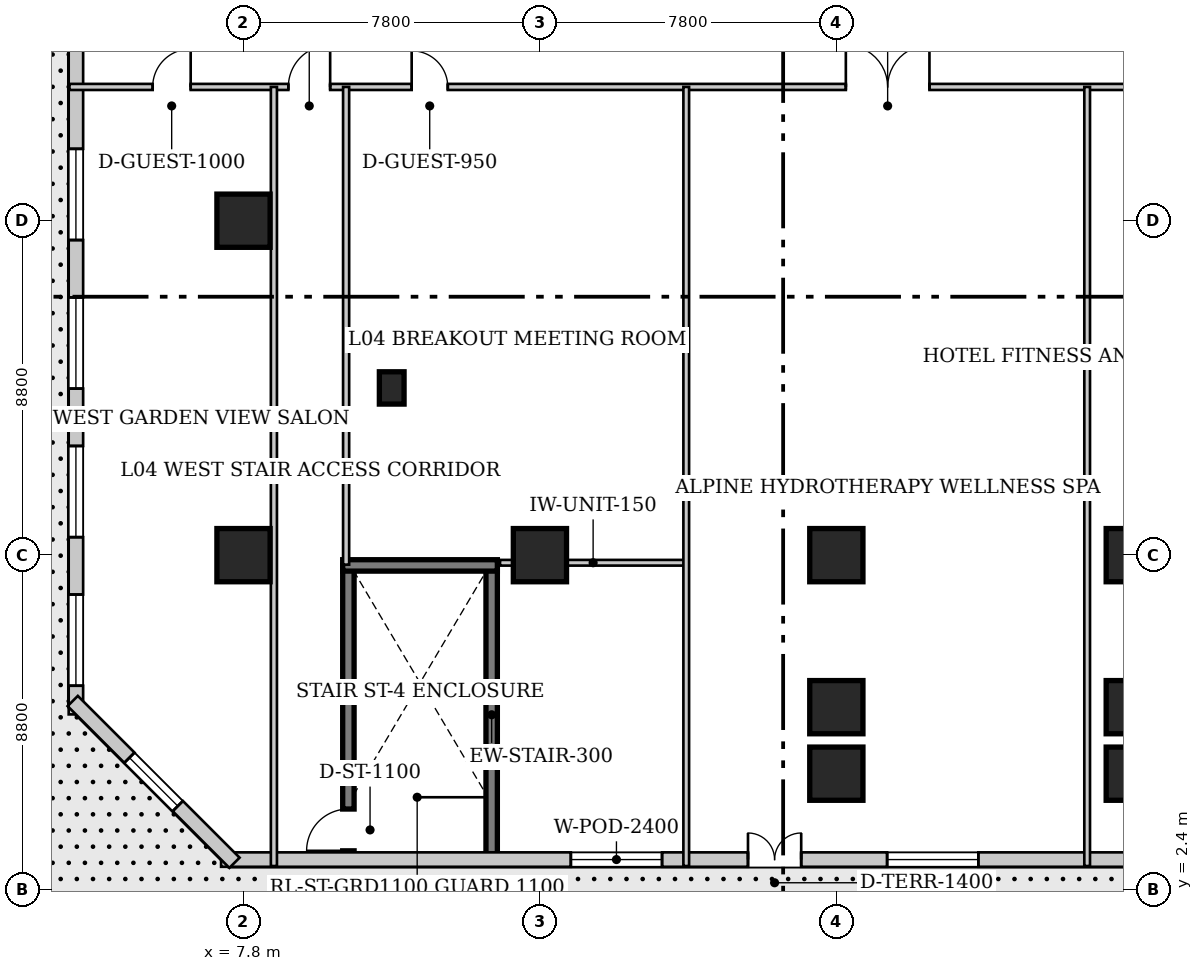
"""IFC4 building model, lengths in metres.
Left out: names, types, materials, properties, quantities, classifications, styles, units other than length and angle.
Written with IfcOpenShell. Run it as: python <this file> out.ifc"""

import sys

from ifc_helpers import new_model, si_unit, direction, frame, frame_2d, origin, origin_2d, place, context, subcontext, project, spatial, rectangle, extrude, element, fill, save


model = new_model("IFC4")
c1 = context("Model", 3, precision=1e-05, world=origin(), true_north=direction((0.0, 1.0)))
c2 = subcontext(c1, "Body", "Model", "MODEL_VIEW")
j1 = project(units=[si_unit("LENGTHUNIT", "METRE"), si_unit("PLANEANGLEUNIT", "RADIAN")], contexts=[c1])
p1 = place(None, origin())
s1 = spatial("IfcSite", under=j1, at=p1, CompositionType="ELEMENT")
p2 = place(p1, origin())
s2 = spatial("IfcBuilding", under=s1, at=p2, CompositionType="ELEMENT")
p3 = place(p2, frame((0.0, 0.0, 20.8)))
s3 = spatial("IfcBuildingStorey", under=s2, at=p3, CompositionType="ELEMENT", Elevation=20.8)
p4 = place(p3, frame((10.56, 3.07, 0.0), z_axis=(0.0, 0.0, 1.0), x_axis=(0.0, 1.0, 0.0)))
e1 = element("IfcWall", 1, at=p4, inside=s3, PredefinedType="SHEAR", context=c2, shape_type="SweptSolid", body=[
    extrude(rectangle(XDim=7.86, YDim=0.3, at=frame_2d((3.93, 0.0))), origin(), (0.0, 0.0, 1.0), 5.2),
])
p5 = place(p4, frame((0.35, 0.0, 0.0)))
e2 = element("IfcOpeningElement", 2, at=p5, cuts=e1, PredefinedType="OPENING", context=c2, shape_type="SweptSolid", body=[
    extrude(rectangle(XDim=1.1, YDim=2.15, at=frame_2d((0.55, 1.075))), frame((0.0, 0.16, 0.0), z_axis=(0.0, -1.0, 0.0), x_axis=(1.0, 0.0, 0.0)), (0.0, 0.0, 1.0), 0.32),
])
p6 = place(p3, frame((14.33, 3.07, 0.0), z_axis=(0.0, 0.0, 1.0), x_axis=(0.0, 1.0, 0.0)))
e3 = element("IfcWall", 3, at=p6, inside=s3, PredefinedType="SHEAR", context=c2, shape_type="SweptSolid", body=[
    extrude(rectangle(XDim=7.86, YDim=0.3, at=frame_2d((3.93, 0.0))), origin(), (0.0, 0.0, 1.0), 5.2),
])
p7 = place(p3, frame((10.41, 10.93, 0.0), z_axis=(0.0, 0.0, 1.0), x_axis=(1.0, 0.0, 0.0)))
e4 = element("IfcWall", 4, at=p7, inside=s3, PredefinedType="SHEAR", context=c2, shape_type="SweptSolid", body=[
    extrude(rectangle(XDim=4.07, YDim=0.3, at=frame_2d((2.035, 0.0))), origin(), (0.0, 0.0, 1.0), 5.2),
])
for number, where, z_axis, x_axis in (
    (5, (7.8, 11.2, 0.0), (0.0, 0.0, 1.0), (1.0, 0.0, 0.0)),
    (6, (7.8, 20.0, 0.0), (0.0, 0.0, 1.0), (1.0, 0.0, 0.0)),
    (7, (15.6, 11.2, 0.0), (0.0, 0.0, 1.0), (1.0, 0.0, 0.0)),
    (8, (23.4, 11.2, 0.0), (0.0, 0.0, 1.0), (1.0, 0.0, 0.0)),
    (9, (31.2, 11.2, 0.0), (0.0, 0.0, 1.0), (1.0, 0.0, 0.0)),
    (10, (23.4, 7.2, 0.0), (0.0, 0.0, 1.0), (1.0, 0.0, 0.0)),
    (11, (31.2, 7.2, 0.0), (0.0, 0.0, 1.0), (1.0, 0.0, 0.0)),
    (12, (23.4, 5.45, 0.0), (0.0, 0.0, 1.0), (1.0, 0.0, 0.0)),
    (13, (31.2, 5.45, 0.0), (0.0, 0.0, 1.0), (1.0, 0.0, 0.0)),
):
    element("IfcColumn", number, at=place(p3, frame(where, z_axis=z_axis, x_axis=x_axis)), inside=s3, PredefinedType="COLUMN", context=c2, shape_type="SweptSolid", body=[
        extrude(rectangle(XDim=1.4, YDim=1.4, at=origin_2d()), origin(), (0.0, 0.0, 1.0), 5.2),
    ])
p8 = place(p3, frame((11.7, 15.6, 0.0), z_axis=(0.0, 0.0, 1.0), x_axis=(1.0, 0.0, 0.0)))
e14 = element("IfcColumn", 14, at=p8, inside=s3, PredefinedType="PILASTER", context=c2, shape_type="SweptSolid", body=[
    extrude(rectangle(XDim=0.65, YDim=0.85, at=origin_2d()), origin(), (0.0, 0.0, 1.0), 5.2),
])
p9 = place(p3, frame((7.21, 3.19, 0.0), z_axis=(0.0, 0.0, 1.0), x_axis=(1.0, 0.0, 0.0)))
e15 = element("IfcWall", 15, at=p9, inside=s3, PredefinedType="SOLIDWALL", context=c2, shape_type="SweptSolid", body=[
    extrude(rectangle(XDim=29.13, YDim=0.38, at=frame_2d((14.565, 0.0))), origin(), (0.0, 0.0, 1.0), 4.94),
])
p10 = place(p9, frame((13.865, 0.0, 0.0)))
e16 = element("IfcOpeningElement", 16, at=p10, cuts=e15, PredefinedType="OPENING", context=c2, shape_type="SweptSolid", body=[
    extrude(rectangle(XDim=1.4, YDim=2.15, at=frame_2d((0.7, 1.075))), frame((0.0, 0.2, 0.0), z_axis=(0.0, -1.0, 0.0), x_axis=(1.0, 0.0, 0.0)), (0.0, 0.0, 1.0), 0.4),
])
p11 = place(p9, frame((9.204, 0.0, 0.75)))
e17 = element("IfcOpeningElement", 17, at=p11, cuts=e15, PredefinedType="OPENING", context=c2, shape_type="SweptSolid", body=[
    extrude(rectangle(XDim=2.4, YDim=2.2, at=frame_2d((1.2, 1.1))), frame((0.0, 0.2, 0.0), z_axis=(0.0, -1.0, 0.0), x_axis=(1.0, 0.0, 0.0)), (0.0, 0.0, 1.0), 0.4),
])
p12 = place(p9, frame((17.526, 0.0, 0.75)))
e18 = element("IfcOpeningElement", 18, at=p12, cuts=e15, PredefinedType="OPENING", context=c2, shape_type="SweptSolid", body=[
    extrude(rectangle(XDim=2.4, YDim=2.2, at=frame_2d((1.2, 1.1))), frame((0.0, 0.2, 0.0), z_axis=(0.0, -1.0, 0.0), x_axis=(1.0, 0.0, 0.0)), (0.0, 0.0, 1.0), 0.4),
])
p13 = place(p9, frame((25.849, 0.0, 0.75)))
e19 = element("IfcOpeningElement", 19, at=p13, cuts=e15, PredefinedType="OPENING", context=c2, shape_type="SweptSolid", body=[
    extrude(rectangle(XDim=2.4, YDim=2.2, at=frame_2d((1.2, 1.1))), frame((0.0, 0.2, 0.0), z_axis=(0.0, -1.0, 0.0), x_axis=(1.0, 0.0, 0.0)), (0.0, 0.0, 1.0), 0.4),
])
p14 = place(p3, frame((3.39, 42.19, 0.0), z_axis=(0.0, 0.0, 1.0), x_axis=(0.0, -1.0, 0.0)))
e20 = element("IfcWall", 20, at=p14, inside=s3, PredefinedType="SOLIDWALL", context=c2, shape_type="SweptSolid", body=[
    extrude(rectangle(XDim=35.18, YDim=0.38, at=frame_2d((17.59, 0.0))), origin(), (0.0, 0.0, 1.0), 4.94),
])
p15 = place(p14, frame((0.754, 0.0, 0.75)))
e21 = element("IfcOpeningElement", 21, at=p15, cuts=e20, PredefinedType="OPENING", context=c2, shape_type="SweptSolid", body=[
    extrude(rectangle(XDim=2.4, YDim=2.2, at=frame_2d((1.2, 1.1))), frame((0.0, 0.2, 0.0), z_axis=(0.0, -1.0, 0.0), x_axis=(1.0, 0.0, 0.0)), (0.0, 0.0, 1.0), 0.4),
])
p16 = place(p14, frame((4.663, 0.0, 0.75)))
e22 = element("IfcOpeningElement", 22, at=p16, cuts=e20, PredefinedType="OPENING", context=c2, shape_type="SweptSolid", body=[
    extrude(rectangle(XDim=2.4, YDim=2.2, at=frame_2d((1.2, 1.1))), frame((0.0, 0.2, 0.0), z_axis=(0.0, -1.0, 0.0), x_axis=(1.0, 0.0, 0.0)), (0.0, 0.0, 1.0), 0.4),
])
p17 = place(p14, frame((8.572, 0.0, 0.75)))
e23 = element("IfcOpeningElement", 23, at=p17, cuts=e20, PredefinedType="OPENING", context=c2, shape_type="SweptSolid", body=[
    extrude(rectangle(XDim=2.4, YDim=2.2, at=frame_2d((1.2, 1.1))), frame((0.0, 0.2, 0.0), z_axis=(0.0, -1.0, 0.0), x_axis=(1.0, 0.0, 0.0)), (0.0, 0.0, 1.0), 0.4),
])
p18 = place(p14, frame((12.481, 0.0, 0.75)))
e24 = element("IfcOpeningElement", 24, at=p18, cuts=e20, PredefinedType="OPENING", context=c2, shape_type="SweptSolid", body=[
    extrude(rectangle(XDim=2.4, YDim=2.2, at=frame_2d((1.2, 1.1))), frame((0.0, 0.2, 0.0), z_axis=(0.0, -1.0, 0.0), x_axis=(1.0, 0.0, 0.0)), (0.0, 0.0, 1.0), 0.4),
])
p19 = place(p14, frame((20.299, 0.0, 0.75)))
e25 = element("IfcOpeningElement", 25, at=p19, cuts=e20, PredefinedType="OPENING", context=c2, shape_type="SweptSolid", body=[
    extrude(rectangle(XDim=2.4, YDim=2.2, at=frame_2d((1.2, 1.1))), frame((0.0, 0.2, 0.0), z_axis=(0.0, -1.0, 0.0), x_axis=(1.0, 0.0, 0.0)), (0.0, 0.0, 1.0), 0.4),
])
p20 = place(p14, frame((24.208, 0.0, 0.75)))
e26 = element("IfcOpeningElement", 26, at=p20, cuts=e20, PredefinedType="OPENING", context=c2, shape_type="SweptSolid", body=[
    extrude(rectangle(XDim=2.4, YDim=2.2, at=frame_2d((1.2, 1.1))), frame((0.0, 0.2, 0.0), z_axis=(0.0, -1.0, 0.0), x_axis=(1.0, 0.0, 0.0)), (0.0, 0.0, 1.0), 0.4),
])
p21 = place(p14, frame((28.117, 0.0, 0.75)))
e27 = element("IfcOpeningElement", 27, at=p21, cuts=e20, PredefinedType="OPENING", context=c2, shape_type="SweptSolid", body=[
    extrude(rectangle(XDim=2.4, YDim=2.2, at=frame_2d((1.2, 1.1))), frame((0.0, 0.2, 0.0), z_axis=(0.0, -1.0, 0.0), x_axis=(1.0, 0.0, 0.0)), (0.0, 0.0, 1.0), 0.4),
])
p22 = place(p14, frame((32.026, 0.0, 0.75)))
e28 = element("IfcOpeningElement", 28, at=p22, cuts=e20, PredefinedType="OPENING", context=c2, shape_type="SweptSolid", body=[
    extrude(rectangle(XDim=2.4, YDim=2.2, at=frame_2d((1.2, 1.1))), frame((0.0, 0.2, 0.0), z_axis=(0.0, -1.0, 0.0), x_axis=(1.0, 0.0, 0.0)), (0.0, 0.0, 1.0), 0.4),
])
p23 = place(p3, frame((3.306, 7.363, 0.0), z_axis=(0.0, 0.0, 1.0), x_axis=(0.707106781187, -0.707106781187, 0.0)))
e29 = element("IfcWall", 29, at=p23, inside=s3, PredefinedType="SOLIDWALL", context=c2, shape_type="SweptSolid", body=[
    extrude(rectangle(XDim=6.019, YDim=0.38, at=frame_2d((3.01, 0.0))), origin(), (0.0, 0.0, 1.0), 4.94),
])
p24 = place(p23, frame((2.11, 0.0, 0.8)))
e30 = element("IfcOpeningElement", 30, at=p24, cuts=e29, PredefinedType="OPENING", context=c2, shape_type="SweptSolid", body=[
    extrude(rectangle(XDim=1.8, YDim=2.1, at=frame_2d((0.9, 1.05))), frame((0.0, 0.2, 0.0), z_axis=(0.0, -1.0, 0.0), x_axis=(1.0, 0.0, 0.0)), (0.0, 0.0, 1.0), 0.4),
])
p25 = place(p3, frame((3.22, 23.52, 0.0), z_axis=(0.0, 0.0, 1.0), x_axis=(1.0, 0.0, 0.0)))
e31 = element("IfcWall", 31, at=p25, inside=s3, PredefinedType="PARTITIONING", context=c2, shape_type="SweptSolid", body=[
    extrude(rectangle(XDim=71.56, YDim=0.16, at=frame_2d((35.78, 0.0))), origin(), (0.0, 0.0, 1.0), 4.94),
])
p26 = place(p25, frame((2.19, 0.0, 0.0)))
e32 = element("IfcOpeningElement", 32, at=p26, cuts=e31, PredefinedType="OPENING", context=c2, shape_type="SweptSolid", body=[
    extrude(rectangle(XDim=1.0, YDim=2.15, at=frame_2d((0.5, 1.075))), frame((0.0, 0.09, 0.0), z_axis=(0.0, -1.0, 0.0), x_axis=(1.0, 0.0, 0.0)), (0.0, 0.0, 1.0), 0.18),
])
p27 = place(p25, frame((5.76, 0.0, 0.0)))
e33 = element("IfcOpeningElement", 33, at=p27, cuts=e31, PredefinedType="OPENING", context=c2, shape_type="SweptSolid", body=[
    extrude(rectangle(XDim=1.1, YDim=2.15, at=frame_2d((0.55, 1.075))), frame((0.0, 0.09, 0.0), z_axis=(0.0, -1.0, 0.0), x_axis=(1.0, 0.0, 0.0)), (0.0, 0.0, 1.0), 0.18),
])
p28 = place(p25, frame((9.005, 0.0, 0.0)))
e34 = element("IfcOpeningElement", 34, at=p28, cuts=e31, PredefinedType="OPENING", context=c2, shape_type="SweptSolid", body=[
    extrude(rectangle(XDim=0.95, YDim=2.1, at=frame_2d((0.475, 1.05))), frame((0.0, 0.09, 0.0), z_axis=(0.0, -1.0, 0.0), x_axis=(1.0, 0.0, 0.0)), (0.0, 0.0, 1.0), 0.18),
])
p29 = place(p25, frame((20.43, 0.0, 0.0)))
e35 = element("IfcOpeningElement", 35, at=p29, cuts=e31, PredefinedType="OPENING", context=c2, shape_type="SweptSolid", body=[
    extrude(rectangle(XDim=2.2, YDim=2.4, at=frame_2d((1.1, 1.2))), frame((0.0, 0.09, 0.0), z_axis=(0.0, -1.0, 0.0), x_axis=(1.0, 0.0, 0.0)), (0.0, 0.0, 1.0), 0.18),
])
p30 = place(p25, frame((29.055, 0.0, 0.0)))
e36 = element("IfcOpeningElement", 36, at=p30, cuts=e31, PredefinedType="OPENING", context=c2, shape_type="SweptSolid", body=[
    extrude(rectangle(XDim=2.2, YDim=2.4, at=frame_2d((1.1, 1.2))), frame((0.0, 0.09, 0.0), z_axis=(0.0, -1.0, 0.0), x_axis=(1.0, 0.0, 0.0)), (0.0, 0.0, 1.0), 0.18),
])
p31 = place(p25, frame((47.505, 0.0, 0.0)))
e37 = element("IfcOpeningElement", 37, at=p31, cuts=e31, PredefinedType="OPENING", context=c2, shape_type="SweptSolid", body=[
    extrude(rectangle(XDim=2.2, YDim=2.4, at=frame_2d((1.1, 1.2))), frame((0.0, 0.09, 0.0), z_axis=(0.0, -1.0, 0.0), x_axis=(1.0, 0.0, 0.0)), (0.0, 0.0, 1.0), 0.18),
])
p32 = place(p25, frame((64.03, 0.0, 0.0)))
e38 = element("IfcOpeningElement", 38, at=p32, cuts=e31, PredefinedType="OPENING", context=c2, shape_type="SweptSolid", body=[
    extrude(rectangle(XDim=2.2, YDim=2.4, at=frame_2d((1.1, 1.2))), frame((0.0, 0.09, 0.0), z_axis=(0.0, -1.0, 0.0), x_axis=(1.0, 0.0, 0.0)), (0.0, 0.0, 1.0), 0.18),
])
p33 = place(p25, frame((35.34, 0.0, 0.0)))
e39 = element("IfcOpeningElement", 39, at=p33, cuts=e31, PredefinedType="OPENING", context=c2, shape_type="SweptSolid", body=[
    extrude(rectangle(XDim=0.88, YDim=2.05, at=frame_2d((0.44, 1.025))), frame((0.0, 0.09, 0.0), z_axis=(0.0, -1.0, 0.0), x_axis=(1.0, 0.0, 0.0)), (0.0, 0.0, 1.0), 0.18),
])
p34 = place(p3, frame((8.6, 3.02, 0.0), z_axis=(0.0, 0.0, 1.0), x_axis=(0.0, 1.0, 0.0)))
e40 = element("IfcWall", 40, at=p34, inside=s3, PredefinedType="PARTITIONING", context=c2, shape_type="SweptSolid", body=[
    extrude(rectangle(XDim=20.5, YDim=0.16, at=frame_2d((10.25, 0.0))), origin(), (0.0, 0.0, 1.0), 4.94),
])
p35 = place(p3, frame((10.5, 10.95, 0.0), z_axis=(0.0, 0.0, 1.0), x_axis=(0.0, 1.0, 0.0)))
e41 = element("IfcWall", 41, at=p35, inside=s3, PredefinedType="PARTITIONING", context=c2, shape_type="SweptSolid", body=[
    extrude(rectangle(XDim=12.57, YDim=0.16, at=frame_2d((6.285, 0.0))), origin(), (0.0, 0.0, 1.0), 4.94),
])
p36 = place(p3, frame((14.55, 11.0, 0.0), z_axis=(0.0, 0.0, 1.0), x_axis=(1.0, 0.0, 0.0)))
e42 = element("IfcWall", 42, at=p36, inside=s3, PredefinedType="PARTITIONING", context=c2, shape_type="SweptSolid", body=[
    extrude(rectangle(XDim=4.9, YDim=0.15, at=frame_2d((2.45, 0.0))), origin(), (0.0, 0.0, 1.0), 3.9),
])
for number, where, z_axis, x_axis in (
    (43, (19.45, 3.02, 0.0), (0.0, 0.0, 1.0), (0.0, 1.0, 0.0)),
    (44, (30.0, 3.02, 0.0), (0.0, 0.0, 1.0), (0.0, 1.0, 0.0)),
):
    element("IfcWall", number, at=place(p3, frame(where, z_axis=z_axis, x_axis=x_axis)), inside=s3, PredefinedType="PARTITIONING", context=c2, shape_type="SweptSolid", body=[
        extrude(rectangle(XDim=20.5, YDim=0.15, at=frame_2d((10.25, 0.0))), origin(), (0.0, 0.0, 1.0), 4.94),
    ])
p37 = place(p10, origin())
e45 = element("IfcDoor", 45, at=p37, inside=s3, OperationType="DOUBLE_DOOR_SINGLE_SWING", PredefinedType="DOOR", context=c2, shape_type="SweptSolid", body=[
    extrude(rectangle(XDim=1.4, YDim=2.15, at=frame_2d((0.7, 1.075))), frame((0.0, 0.025, 0.0), z_axis=(0.0, -1.0, 0.0), x_axis=(1.0, 0.0, 0.0)), (0.0, 0.0, 1.0), 0.05),
])
fill(e16, e45)
p38 = place(p11, origin())
e46 = element("IfcWindow", 46, at=p38, inside=s3, PartitioningType="SINGLE_PANEL", PredefinedType="WINDOW", context=c2, shape_type="SweptSolid", body=[
    extrude(rectangle(XDim=2.4, YDim=2.2, at=frame_2d((1.2, 1.1))), frame((0.0, 0.03, 0.0), z_axis=(0.0, -1.0, 0.0), x_axis=(1.0, 0.0, 0.0)), (0.0, 0.0, 1.0), 0.06),
])
fill(e17, e46)
p39 = place(p12, origin())
e47 = element("IfcWindow", 47, at=p39, inside=s3, PartitioningType="SINGLE_PANEL", PredefinedType="WINDOW", context=c2, shape_type="SweptSolid", body=[
    extrude(rectangle(XDim=2.4, YDim=2.2, at=frame_2d((1.2, 1.1))), frame((0.0, 0.03, 0.0), z_axis=(0.0, -1.0, 0.0), x_axis=(1.0, 0.0, 0.0)), (0.0, 0.0, 1.0), 0.06),
])
fill(e18, e47)
p40 = place(p19, origin())
e48 = element("IfcWindow", 48, at=p40, inside=s3, PartitioningType="SINGLE_PANEL", PredefinedType="WINDOW", context=c2, shape_type="SweptSolid", body=[
    extrude(rectangle(XDim=2.4, YDim=2.2, at=frame_2d((1.2, 1.1))), frame((0.0, 0.03, 0.0), z_axis=(0.0, -1.0, 0.0), x_axis=(1.0, 0.0, 0.0)), (0.0, 0.0, 1.0), 0.06),
])
fill(e25, e48)
p41 = place(p20, origin())
e49 = element("IfcWindow", 49, at=p41, inside=s3, PartitioningType="SINGLE_PANEL", PredefinedType="WINDOW", context=c2, shape_type="SweptSolid", body=[
    extrude(rectangle(XDim=2.4, YDim=2.2, at=frame_2d((1.2, 1.1))), frame((0.0, 0.03, 0.0), z_axis=(0.0, -1.0, 0.0), x_axis=(1.0, 0.0, 0.0)), (0.0, 0.0, 1.0), 0.06),
])
fill(e26, e49)
p42 = place(p21, origin())
e50 = element("IfcWindow", 50, at=p42, inside=s3, PartitioningType="SINGLE_PANEL", PredefinedType="WINDOW", context=c2, shape_type="SweptSolid", body=[
    extrude(rectangle(XDim=2.4, YDim=2.2, at=frame_2d((1.2, 1.1))), frame((0.0, 0.03, 0.0), z_axis=(0.0, -1.0, 0.0), x_axis=(1.0, 0.0, 0.0)), (0.0, 0.0, 1.0), 0.06),
])
fill(e27, e50)
p43 = place(p22, origin())
e51 = element("IfcWindow", 51, at=p43, inside=s3, PartitioningType="SINGLE_PANEL", PredefinedType="WINDOW", context=c2, shape_type="SweptSolid", body=[
    extrude(rectangle(XDim=2.4, YDim=2.2, at=frame_2d((1.2, 1.1))), frame((0.0, 0.03, 0.0), z_axis=(0.0, -1.0, 0.0), x_axis=(1.0, 0.0, 0.0)), (0.0, 0.0, 1.0), 0.06),
])
fill(e28, e51)
p44 = place(p24, origin())
e52 = element("IfcWindow", 52, at=p44, inside=s3, PartitioningType="SINGLE_PANEL", PredefinedType="WINDOW", context=c2, shape_type="SweptSolid", body=[
    extrude(rectangle(XDim=1.8, YDim=2.1, at=frame_2d((0.9, 1.05))), frame((0.0, 0.03, 0.0), z_axis=(0.0, -1.0, 0.0), x_axis=(1.0, 0.0, 0.0)), (0.0, 0.0, 1.0), 0.06),
])
fill(e30, e52)
p45 = place(p26, origin())
e53 = element("IfcDoor", 53, at=p45, inside=s3, OperationType="SINGLE_SWING_RIGHT", PredefinedType="DOOR", context=c2, shape_type="SweptSolid", body=[
    extrude(rectangle(XDim=1.0, YDim=2.15, at=frame_2d((0.5, 1.075))), frame((0.0, 0.025, 0.0), z_axis=(0.0, -1.0, 0.0), x_axis=(1.0, 0.0, 0.0)), (0.0, 0.0, 1.0), 0.05),
])
fill(e32, e53)
p46 = place(p27, origin())
e54 = element("IfcDoor", 54, at=p46, inside=s3, OperationType="SINGLE_SWING_RIGHT", PredefinedType="DOOR", context=c2, shape_type="SweptSolid", body=[
    extrude(rectangle(XDim=1.1, YDim=2.15, at=frame_2d((0.55, 1.075))), frame((0.0, 0.025, 0.0), z_axis=(0.0, -1.0, 0.0), x_axis=(1.0, 0.0, 0.0)), (0.0, 0.0, 1.0), 0.05),
])
fill(e33, e54)
p47 = place(p28, origin())
e55 = element("IfcDoor", 55, at=p47, inside=s3, OperationType="SINGLE_SWING_LEFT", PredefinedType="DOOR", context=c2, shape_type="SweptSolid", body=[
    extrude(rectangle(XDim=0.95, YDim=2.1, at=frame_2d((0.475, 1.05))), frame((0.0, 0.025, 0.0), z_axis=(0.0, -1.0, 0.0), x_axis=(1.0, 0.0, 0.0)), (0.0, 0.0, 1.0), 0.05),
])
fill(e34, e55)
p48 = place(p29, origin())
e56 = element("IfcDoor", 56, at=p48, inside=s3, OperationType="DOUBLE_DOOR_SINGLE_SWING", PredefinedType="DOOR", context=c2, shape_type="SweptSolid", body=[
    extrude(rectangle(XDim=2.2, YDim=2.4, at=frame_2d((1.1, 1.2))), frame((0.0, 0.025, 0.0), z_axis=(0.0, -1.0, 0.0), x_axis=(1.0, 0.0, 0.0)), (0.0, 0.0, 1.0), 0.05),
])
fill(e35, e56)
p49 = place(p5, origin())
e57 = element("IfcDoor", 57, at=p49, inside=s3, OperationType="SINGLE_SWING_LEFT", PredefinedType="DOOR", context=c2, shape_type="SweptSolid", body=[
    extrude(rectangle(XDim=1.1, YDim=2.15, at=frame_2d((0.55, 1.075))), frame((0.0, 0.025, 0.0), z_axis=(0.0, -1.0, 0.0), x_axis=(1.0, 0.0, 0.0)), (0.0, 0.0, 1.0), 0.05),
])
fill(e2, e57)
save(model, sys.argv[1])
